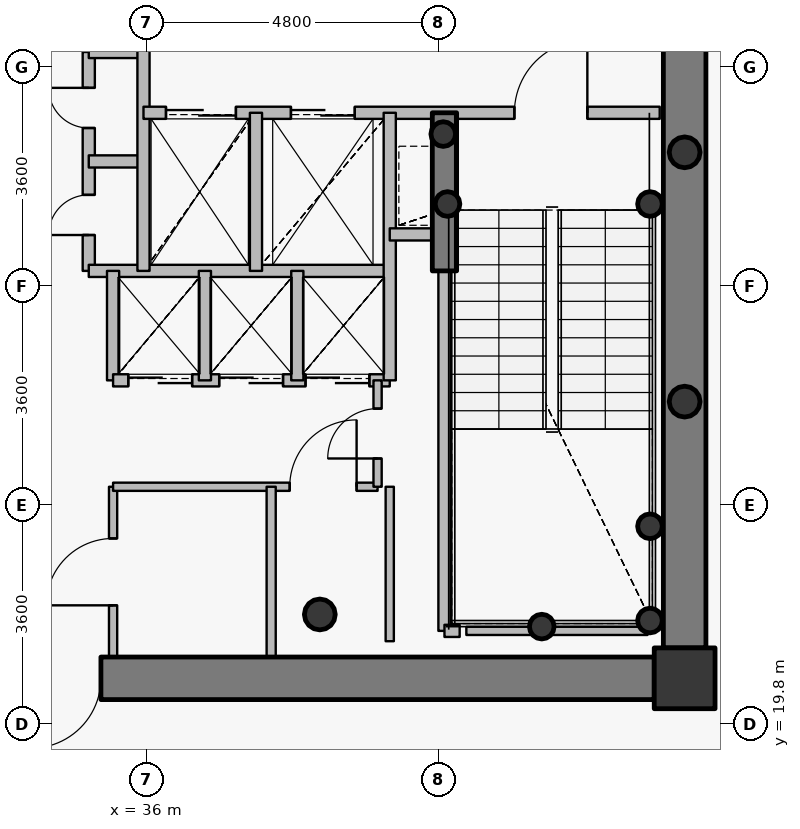
"""IFC4 building model, lengths in metres.
Left out: names, types, materials, properties, quantities, classifications, styles, units other than length and angle.
Written with IfcOpenShell. Run it as: python <this file> out.ifc"""

import sys

from ifc_helpers import new_model, si_unit, direction, frame, frame_2d, origin, origin_2d, place, context, subcontext, project, spatial, rectangle, hollow_circle, extrude, source, transform, mapped, element, fill, save


model = new_model("IFC4")
c1 = context("Model", 3, precision=1e-05, world=origin(), true_north=direction((0.0, 1.0)))
c2 = subcontext(c1, "Body", "Model", "MODEL_VIEW")
j1 = project(units=[si_unit("LENGTHUNIT", "METRE"), si_unit("PLANEANGLEUNIT", "RADIAN")], contexts=[c1])
p1 = place(None, origin())
s1 = spatial("IfcSite", under=j1, at=p1, CompositionType="ELEMENT")
p2 = place(p1, origin())
s2 = spatial("IfcBuilding", under=s1, at=p2, CompositionType="ELEMENT")
p3 = place(p2, frame((0.0, 0.0, 280.5)))
s3 = spatial("IfcBuildingStorey", under=s2, at=p3, CompositionType="ELEMENT", Elevation=280.5)
p4 = place(p3, frame((44.85, 20.55, 0.0), z_axis=(0.0, 0.0, 1.0), x_axis=(1.0, 0.0, 0.0)))
e1 = element("IfcColumn", 1, at=p4, inside=s3, PredefinedType="COLUMN", context=c2, shape_type="SweptSolid", body=[
    extrude(rectangle(XDim=1.0, YDim=1.0, at=origin_2d()), origin(), (0.0, 0.0, 1.0), 3.75),
])
p5 = place(p3, frame((38.85, 21.6, 0.0), z_axis=(0.0, 0.0, 1.0), x_axis=(1.0, 0.0, 0.0)))
e2 = element("IfcColumn", 2, at=p5, inside=s3, PredefinedType="COLUMN", context=c2, shape_type="SweptSolid", body=[
    extrude(hollow_circle(Radius=0.254, WallThickness=0.02, at=origin_2d()), origin(), (0.0, 0.0, 1.0), 3.75),
])
for number, where, z_axis, x_axis in (
    (3, (44.28, 21.5, 0.0), (0.0, 0.0, 1.0), (1.0, 0.0, 0.0)),
    (4, (44.28, 23.05, 0.0), (0.0, 0.0, 1.0), (1.0, 0.0, 0.0)),
    (5, (42.5, 21.4, 0.0), (0.0, 0.0, 1.0), (1.0, 0.0, 0.0)),
    (6, (40.95, 28.35, 0.0), (0.0, 0.0, 1.0), (1.0, 0.0, 0.0)),
    (7, (44.28, 28.35, 0.0), (0.0, 0.0, 1.0), (1.0, 0.0, 0.0)),
    (8, (40.88, 29.5, 0.0), (0.0, 0.0, 1.0), (1.0, 0.0, 0.0)),
):
    element("IfcColumn", number, at=place(p3, frame(where, z_axis=z_axis, x_axis=x_axis)), inside=s3, PredefinedType="COLUMN", context=c2, shape_type="SweptSolid", body=[
        extrude(hollow_circle(Radius=0.203, WallThickness=0.016, at=origin_2d()), origin(), (0.0, 0.0, 1.0), 3.75),
    ])
p6 = place(p3, frame((44.85, 32.95, 0.0), z_axis=(0.0, 0.0, 1.0), x_axis=(0.0, -1.0, 0.0)))
e9 = element("IfcWall", 9, at=p6, inside=s3, PredefinedType="SHEAR", context=c2, shape_type="SweptSolid", body=[
    extrude(rectangle(XDim=11.9, YDim=0.7, at=frame_2d((5.95, 0.0))), origin(), (0.0, 0.0, 1.0), 3.05),
])
p7 = place(p3, frame((44.35, 20.55, 0.0), z_axis=(0.0, 0.0, 1.0), x_axis=(-1.0, 0.0, 0.0)))
e10 = element("IfcWall", 10, at=p7, inside=s3, PredefinedType="SHEAR", context=c2, shape_type="SweptSolid", body=[
    extrude(rectangle(XDim=16.7, YDim=0.7, at=frame_2d((8.35, 0.0))), origin(), (0.0, 0.0, 1.0), 3.05),
])
p8 = place(p7, frame((12.925, 0.0, 0.0)))
e11 = element("IfcOpeningElement", 11, at=p8, cuts=e10, PredefinedType="OPENING", context=c2, shape_type="SweptSolid", body=[
    extrude(rectangle(XDim=1.15, YDim=2.15, at=origin_2d()), frame((0.575, 0.36, 1.075), z_axis=(0.0, -1.0, 0.0), x_axis=(1.0, 0.0, 0.0)), (0.0, 0.0, 1.0), 0.72),
])
p9 = place(p7, frame((9.1, 0.0, 0.0)))
e12 = element("IfcOpeningElement", 12, at=p9, cuts=e10, PredefinedType="OPENING", context=c2, shape_type="SweptSolid", body=[
    extrude(rectangle(XDim=1.15, YDim=2.15, at=origin_2d()), frame((0.575, 0.36, 1.075), z_axis=(0.0, -1.0, 0.0), x_axis=(1.0, 0.0, 0.0)), (0.0, 0.0, 1.0), 0.72),
])
p10 = place(p3, frame((40.9, 27.25, 0.0), z_axis=(0.0, 0.0, 1.0), x_axis=(0.0, 1.0, 0.0)))
e13 = element("IfcWall", 13, at=p10, inside=s3, PredefinedType="SHEAR", context=c2, shape_type="SweptSolid", body=[
    extrude(rectangle(XDim=2.6, YDim=0.4, at=frame_2d((1.3, 0.0))), origin(), (0.0, 0.0, 1.0), 3.1),
])
for number, where, z_axis, x_axis in (
    (14, (44.85, 25.1, 0.0), (0.0, 0.0, 1.0), (1.0, 0.0, 0.0)),
    (15, (44.85, 29.2, 0.0), (0.0, 0.0, 1.0), (1.0, 0.0, 0.0)),
):
    element("IfcColumn", number, at=place(p3, frame(where, z_axis=z_axis, x_axis=x_axis)), inside=s3, PredefinedType="COLUMN", context=c2, shape_type="SweptSolid", body=[
        extrude(hollow_circle(Radius=0.254, WallThickness=0.02, at=origin_2d()), origin(), (0.0, 0.0, 1.0), 3.75),
    ])
p11 = place(p3, frame((35.05, 27.25, 0.0), z_axis=(0.0, 0.0, 1.0), x_axis=(0.0, 1.0, 0.0)))
e16 = element("IfcWall", 16, at=p11, inside=s3, PredefinedType="PARTITIONING", context=c2, shape_type="SweptSolid", body=[
    extrude(rectangle(XDim=3.6, YDim=0.2, at=frame_2d((1.8, 0.0))), origin(), (0.0, 0.0, 1.0), 3.5),
])
p12 = place(p11, frame((0.59, 0.0, 0.0)))
e17 = element("IfcOpeningElement", 17, at=p12, cuts=e16, PredefinedType="OPENING", context=c2, shape_type="SweptSolid", body=[
    extrude(rectangle(XDim=0.66, YDim=2.05, at=origin_2d()), frame((0.33, 0.11, 1.025), z_axis=(0.0, -1.0, 0.0), x_axis=(1.0, 0.0, 0.0)), (0.0, 0.0, 1.0), 0.22),
])
p13 = place(p11, frame((2.35, 0.0, 0.0)))
e18 = element("IfcOpeningElement", 18, at=p13, cuts=e16, PredefinedType="OPENING", context=c2, shape_type="SweptSolid", body=[
    extrude(rectangle(XDim=0.66, YDim=2.05, at=origin_2d()), frame((0.33, 0.11, 1.025), z_axis=(0.0, -1.0, 0.0), x_axis=(1.0, 0.0, 0.0)), (0.0, 0.0, 1.0), 0.22),
])
p14 = place(p3, frame((35.05, 27.25, 0.0), z_axis=(0.0, 0.0, 1.0), x_axis=(1.0, 0.0, 0.0)))
e19 = element("IfcWall", 19, at=p14, inside=s3, PredefinedType="PARTITIONING", context=c2, shape_type="SweptSolid", body=[
    extrude(rectangle(XDim=4.95, YDim=0.2, at=frame_2d((2.475, 0.0))), origin(), (0.0, 0.0, 1.0), 3.085),
])
for number, where, z_axis, x_axis in (
    (20, (35.05, 29.05, 0.0), (0.0, 0.0, 1.0), (1.0, 0.0, 0.0)),
    (21, (35.05, 30.85, 0.0), (0.0, 0.0, 1.0), (1.0, 0.0, 0.0)),
):
    element("IfcWall", number, at=place(p3, frame(where, z_axis=z_axis, x_axis=x_axis)), inside=s3, PredefinedType="PARTITIONING", context=c2, shape_type="SweptSolid", body=[
        extrude(rectangle(XDim=0.9, YDim=0.2, at=frame_2d((0.45, 0.0))), origin(), (0.0, 0.0, 1.0), 3.5),
    ])
p15 = place(p3, frame((35.45, 20.9, 0.0), z_axis=(0.0, 0.0, 1.0), x_axis=(0.0, 1.0, 0.0)))
e22 = element("IfcWall", 22, at=p15, inside=s3, PredefinedType="PARTITIONING", context=c2, shape_type="SweptSolid", body=[
    extrude(rectangle(XDim=2.8, YDim=0.135, at=frame_2d((1.4, 0.0))), origin(), (0.0, 0.0, 1.0), 3.085),
])
p16 = place(p15, frame((0.85, 0.0, 0.0)))
e23 = element("IfcOpeningElement", 23, at=p16, cuts=e22, PredefinedType="OPENING", context=c2, shape_type="SweptSolid", body=[
    extrude(rectangle(XDim=1.1, YDim=2.15, at=origin_2d()), frame((0.55, 0.078, 1.075), z_axis=(0.0, -1.0, 0.0), x_axis=(1.0, 0.0, 0.0)), (0.0, 0.0, 1.0), 0.155),
])
p17 = place(p3, frame((35.45, 23.7, 0.0), z_axis=(0.0, 0.0, 1.0), x_axis=(1.0, 0.0, 0.0)))
e24 = element("IfcWall", 24, at=p17, inside=s3, PredefinedType="PARTITIONING", context=c2, shape_type="SweptSolid", body=[
    extrude(rectangle(XDim=4.35, YDim=0.135, at=frame_2d((2.175, 0.0))), origin(), (0.0, 0.0, 1.0), 3.085),
])
p18 = place(p17, frame((2.905, 0.0, 0.0)))
e25 = element("IfcOpeningElement", 25, at=p18, cuts=e24, PredefinedType="OPENING", context=c2, shape_type="SweptSolid", body=[
    extrude(rectangle(XDim=1.1, YDim=2.15, at=origin_2d()), frame((0.55, 0.078, 1.075), z_axis=(0.0, -1.0, 0.0), x_axis=(1.0, 0.0, 0.0)), (0.0, 0.0, 1.0), 0.155),
])
p19 = place(p3, frame((35.45, 25.45, 0.0), z_axis=(0.0, 0.0, 1.0), x_axis=(0.0, 1.0, 0.0)))
e26 = element("IfcWall", 26, at=p19, inside=s3, PredefinedType="PARTITIONING", context=c2, shape_type="SweptSolid", body=[
    extrude(rectangle(XDim=1.8, YDim=0.2, at=frame_2d((0.9, 0.0))), origin(), (0.0, 0.0, 1.0), 3.5),
])
p20 = place(p3, frame((35.45, 25.45, 0.0), z_axis=(0.0, 0.0, 1.0), x_axis=(1.0, 0.0, 0.0)))
e27 = element("IfcWall", 27, at=p20, inside=s3, PredefinedType="PARTITIONING", context=c2, shape_type="SweptSolid", body=[
    extrude(rectangle(XDim=4.55, YDim=0.2, at=frame_2d((2.275, 0.0))), origin(), (0.0, 0.0, 1.0), 3.085),
])
p21 = place(p20, frame((0.25, 0.0, 0.0)))
e28 = element("IfcOpeningElement", 28, at=p21, cuts=e27, PredefinedType="OPENING", context=c2, shape_type="SweptSolid", body=[
    extrude(rectangle(XDim=1.05, YDim=2.15, at=origin_2d()), frame((0.525, 0.11, 1.075), z_axis=(0.0, -1.0, 0.0), x_axis=(1.0, 0.0, 0.0)), (0.0, 0.0, 1.0), 0.22),
])
p22 = place(p20, frame((1.745, 0.0, 0.0)))
e29 = element("IfcOpeningElement", 29, at=p22, cuts=e27, PredefinedType="OPENING", context=c2, shape_type="SweptSolid", body=[
    extrude(rectangle(XDim=1.05, YDim=2.15, at=origin_2d()), frame((0.525, 0.11, 1.075), z_axis=(0.0, -1.0, 0.0), x_axis=(1.0, 0.0, 0.0)), (0.0, 0.0, 1.0), 0.22),
])
p23 = place(p20, frame((3.165, 0.0, 0.0)))
e30 = element("IfcOpeningElement", 30, at=p23, cuts=e27, PredefinedType="OPENING", context=c2, shape_type="SweptSolid", body=[
    extrude(rectangle(XDim=1.05, YDim=2.15, at=origin_2d()), frame((0.525, 0.11, 1.075), z_axis=(0.0, -1.0, 0.0), x_axis=(1.0, 0.0, 0.0)), (0.0, 0.0, 1.0), 0.22),
])
p24 = place(p3, frame((35.95, 27.25, 0.0), z_axis=(0.0, 0.0, 1.0), x_axis=(0.0, 1.0, 0.0)))
e31 = element("IfcWall", 31, at=p24, inside=s3, PredefinedType="PARTITIONING", context=c2, shape_type="SweptSolid", body=[
    extrude(rectangle(XDim=3.8, YDim=0.2, at=frame_2d((1.9, 0.0))), origin(), (0.0, 0.0, 1.0), 3.5),
])
p25 = place(p3, frame((35.95, 29.85, 0.0), z_axis=(0.0, 0.0, 1.0), x_axis=(1.0, 0.0, 0.0)))
e32 = element("IfcWall", 32, at=p25, inside=s3, PredefinedType="PARTITIONING", context=c2, shape_type="SweptSolid", body=[
    extrude(rectangle(XDim=8.49, YDim=0.2, at=frame_2d((4.245, 0.0))), origin(), (0.0, 0.0, 1.0), 3.085),
])
p26 = place(p25, frame((6.1, 0.0, 0.0)))
e33 = element("IfcOpeningElement", 33, at=p26, cuts=e32, PredefinedType="OPENING", context=c2, shape_type="SweptSolid", body=[
    extrude(rectangle(XDim=1.2, YDim=2.15, at=origin_2d()), frame((0.6, 0.11, 1.075), z_axis=(0.0, -1.0, 0.0), x_axis=(1.0, 0.0, 0.0)), (0.0, 0.0, 1.0), 0.22),
])
p27 = place(p25, frame((0.37, 0.0, 0.0)))
e34 = element("IfcOpeningElement", 34, at=p27, cuts=e32, PredefinedType="OPENING", context=c2, shape_type="SweptSolid", body=[
    extrude(rectangle(XDim=1.15, YDim=2.15, at=origin_2d()), frame((0.575, 0.11, 1.075), z_axis=(0.0, -1.0, 0.0), x_axis=(1.0, 0.0, 0.0)), (0.0, 0.0, 1.0), 0.22),
])
p28 = place(p25, frame((2.425, 0.0, 0.0)))
e35 = element("IfcOpeningElement", 35, at=p28, cuts=e32, PredefinedType="OPENING", context=c2, shape_type="SweptSolid", body=[
    extrude(rectangle(XDim=1.05, YDim=2.15, at=origin_2d()), frame((0.525, 0.11, 1.075), z_axis=(0.0, -1.0, 0.0), x_axis=(1.0, 0.0, 0.0)), (0.0, 0.0, 1.0), 0.22),
])
p29 = place(p3, frame((36.96, 25.45, 0.0), z_axis=(0.0, 0.0, 1.0), x_axis=(0.0, 1.0, 0.0)))
e36 = element("IfcWall", 36, at=p29, inside=s3, PredefinedType="PARTITIONING", context=c2, shape_type="SweptSolid", body=[
    extrude(rectangle(XDim=1.8, YDim=0.2, at=frame_2d((0.9, 0.0))), origin(), (0.0, 0.0, 1.0), 3.5),
])
p30 = place(p3, frame((37.8, 27.25, 0.0), z_axis=(0.0, 0.0, 1.0), x_axis=(0.0, 1.0, 0.0)))
e37 = element("IfcWall", 37, at=p30, inside=s3, PredefinedType="PARTITIONING", context=c2, shape_type="SweptSolid", body=[
    extrude(rectangle(XDim=2.6, YDim=0.2, at=frame_2d((1.3, 0.0))), origin(), (0.0, 0.0, 1.0), 3.5),
])
p31 = place(p3, frame((38.05, 20.38, 0.0), z_axis=(0.0, 0.0, 1.0), x_axis=(0.0, 1.0, 0.0)))
e38 = element("IfcWall", 38, at=p31, inside=s3, PredefinedType="PARTITIONING", context=c2, shape_type="SweptSolid", body=[
    extrude(rectangle(XDim=3.32, YDim=0.15, at=frame_2d((1.66, 0.0))), origin(), (0.0, 0.0, 1.0), 3.035),
])
p32 = place(p3, frame((38.48, 25.45, 0.0), z_axis=(0.0, 0.0, 1.0), x_axis=(0.0, 1.0, 0.0)))
e39 = element("IfcWall", 39, at=p32, inside=s3, PredefinedType="PARTITIONING", context=c2, shape_type="SweptSolid", body=[
    extrude(rectangle(XDim=1.8, YDim=0.2, at=frame_2d((0.9, 0.0))), origin(), (0.0, 0.0, 1.0), 3.5),
])
p33 = place(p3, frame((39.8, 23.7, 0.0), z_axis=(0.0, 0.0, 1.0), x_axis=(0.0, 1.0, 0.0)))
e40 = element("IfcWall", 40, at=p33, inside=s3, PredefinedType="PARTITIONING", context=c2, shape_type="SweptSolid", body=[
    extrude(rectangle(XDim=1.75, YDim=0.135, at=frame_2d((0.875, 0.0))), origin(), (0.0, 0.0, 1.0), 3.5),
])
p34 = place(p33, frame((0.465, 0.0, 0.0)))
e41 = element("IfcOpeningElement", 41, at=p34, cuts=e40, PredefinedType="OPENING", context=c2, shape_type="SweptSolid", body=[
    extrude(rectangle(XDim=0.82, YDim=2.1, at=origin_2d()), frame((0.41, 0.078, 1.05), z_axis=(0.0, -1.0, 0.0), x_axis=(1.0, 0.0, 0.0)), (0.0, 0.0, 1.0), 0.155),
])
p35 = place(p3, frame((40.0, 25.45, 0.0), z_axis=(0.0, 0.0, 1.0), x_axis=(0.0, 1.0, 0.0)))
e42 = element("IfcWall", 42, at=p35, inside=s3, PredefinedType="PARTITIONING", context=c2, shape_type="SweptSolid", body=[
    extrude(rectangle(XDim=4.4, YDim=0.2, at=frame_2d((2.2, 0.0))), origin(), (0.0, 0.0, 1.0), 3.5),
])
p36 = place(p3, frame((40.0, 27.85, 0.0), z_axis=(0.0, 0.0, 1.0), x_axis=(1.0, 0.0, 0.0)))
e43 = element("IfcWall", 43, at=p36, inside=s3, PredefinedType="PARTITIONING", context=c2, shape_type="SweptSolid", body=[
    extrude(rectangle(XDim=0.9, YDim=0.2, at=frame_2d((0.45, 0.0))), origin(), (0.0, 0.0, 1.0), 3.5),
])
p37 = place(p3, frame((40.9, 21.33, 0.0), z_axis=(0.0, 0.0, 1.0), x_axis=(0.0, 1.0, 0.0)))
e44 = element("IfcWall", 44, at=p37, inside=s3, PredefinedType="PARTITIONING", context=c2, shape_type="SweptSolid", body=[
    extrude(rectangle(XDim=5.91, YDim=0.2, at=frame_2d((2.955, 0.0))), origin(), (0.0, 0.0, 1.0), 3.035),
])
p38 = place(p3, frame((40.9, 21.33, 0.0), z_axis=(0.0, 0.0, 1.0), x_axis=(1.0, 0.0, 0.0)))
e45 = element("IfcWall", 45, at=p38, inside=s3, PredefinedType="PARTITIONING", context=c2, shape_type="SweptSolid", body=[
    extrude(rectangle(XDim=0.25, YDim=0.2, at=frame_2d((0.125, 0.0))), origin(), (0.0, 0.0, 1.0), 3.035),
])
p39 = place(p3, frame((44.24, 21.33, 0.0), z_axis=(0.0, 0.0, 1.0), x_axis=(-1.0, 0.0, 0.0)))
e46 = element("IfcWall", 46, at=p39, inside=s3, PredefinedType="PARTITIONING", context=c2, shape_type="SweptSolid", body=[
    extrude(rectangle(XDim=2.98, YDim=0.135, at=frame_2d((1.49, 0.0))), origin(), (0.0, 0.0, 1.0), 3.035),
])
p40 = place(p3, frame((40.0, 23.7, 0.0), z_axis=(0.0, 0.0, 1.0), x_axis=(0.0, -1.0, 0.0)))
e47 = element("IfcWall", 47, at=p40, inside=s3, PredefinedType="PARTITIONING", context=c2, shape_type="SweptSolid", body=[
    extrude(rectangle(XDim=2.54, YDim=0.135, at=frame_2d((1.27, 0.0))), origin(), (0.0, 0.0, 1.0), 3.035),
])
p41 = place(p3, frame((44.36, 20.2, 0.0), z_axis=(0.0, 0.0, 1.0), x_axis=(1.0, 0.0, 0.0)))
e48 = element("IfcWall", 48, at=p41, inside=s3, PredefinedType="PARTITIONING", context=c2, shape_type="SweptSolid", body=[
    extrude(rectangle(XDim=0.84, YDim=0.135, at=frame_2d((0.42, 0.0))), origin(), (0.0, 0.0, 1.0), 3.035),
])
p42 = place(p3, frame((45.2, 20.508, 0.0), z_axis=(0.0, 0.0, 1.0), x_axis=(0.0, 1.0, 0.0)))
e49 = element("IfcWall", 49, at=p42, inside=s3, PredefinedType="PARTITIONING", context=c2, shape_type="SweptSolid", body=[
    extrude(rectangle(XDim=0.532, YDim=0.135, at=frame_2d((0.266, 0.0))), origin(), (0.0, 0.0, 1.0), 3.5),
])
m1 = source(origin(), c2, "Body", "SweptSolid", [
    extrude(rectangle(XDim=1.15, YDim=2.15, at=origin_2d()), frame((0.575, 0.025, 1.075), z_axis=(0.0, -1.0, 0.0), x_axis=(1.0, 0.0, 0.0)), (0.0, 0.0, 1.0), 0.05),
])
p43 = place(p9, origin())
e50 = element("IfcDoor", 50, at=p43, inside=s3, OperationType="SINGLE_SWING_RIGHT", PredefinedType="DOOR", context=c2, shape_type="MappedRepresentation", body=[
    mapped(m1, transform((0.0, 0.0, 0.0), x_axis=(1.0, 0.0, 0.0), y_axis=(0.0, 1.0, 0.0), z_axis=(0.0, 0.0, 1.0), scale=1.0)),
])
fill(e12, e50)
m2 = source(origin(), c2, "Body", "SweptSolid", [
    extrude(rectangle(XDim=1.2, YDim=2.15, at=origin_2d()), frame((0.6, 0.025, 1.075), z_axis=(0.0, -1.0, 0.0), x_axis=(1.0, 0.0, 0.0)), (0.0, 0.0, 1.0), 0.05),
])
p44 = place(p26, origin())
e51 = element("IfcDoor", 51, at=p44, inside=s3, OperationType="SINGLE_SWING_RIGHT", PredefinedType="DOOR", context=c2, shape_type="MappedRepresentation", body=[
    mapped(m2, transform((0.0, 0.0, 0.0), x_axis=(1.0, 0.0, 0.0), y_axis=(0.0, 1.0, 0.0), z_axis=(0.0, 0.0, 1.0), scale=1.0)),
])
fill(e33, e51)
m3 = source(origin(), c2, "Body", "SweptSolid", [
    extrude(rectangle(XDim=1.15, YDim=2.15, at=origin_2d()), frame((0.575, 0.025, 1.075), z_axis=(0.0, -1.0, 0.0), x_axis=(1.0, 0.0, 0.0)), (0.0, 0.0, 1.0), 0.05),
])
p45 = place(p27, origin())
e52 = element("IfcDoor", 52, at=p45, inside=s3, OperationType="DOUBLE_DOOR_SLIDING", PredefinedType="USERDEFINED", context=c2, shape_type="MappedRepresentation", body=[
    mapped(m3, transform((0.0, 0.0, 0.0), x_axis=(1.0, 0.0, 0.0), y_axis=(0.0, 1.0, 0.0), z_axis=(0.0, 0.0, 1.0), scale=1.0)),
])
fill(e34, e52)
m4 = source(origin(), c2, "Body", "SweptSolid", [
    extrude(rectangle(XDim=1.05, YDim=2.15, at=origin_2d()), frame((0.525, 0.025, 1.075), z_axis=(0.0, -1.0, 0.0), x_axis=(1.0, 0.0, 0.0)), (0.0, 0.0, 1.0), 0.05),
])
p46 = place(p28, origin())
e53 = element("IfcDoor", 53, at=p46, inside=s3, OperationType="DOUBLE_DOOR_SLIDING", PredefinedType="USERDEFINED", context=c2, shape_type="MappedRepresentation", body=[
    mapped(m4, transform((0.0, 0.0, 0.0), x_axis=(1.0, 0.0, 0.0), y_axis=(0.0, 1.0, 0.0), z_axis=(0.0, 0.0, 1.0), scale=1.0)),
])
fill(e35, e53)
p47 = place(p21, origin())
e54 = element("IfcDoor", 54, at=p47, inside=s3, OperationType="DOUBLE_DOOR_SLIDING", PredefinedType="USERDEFINED", context=c2, shape_type="MappedRepresentation", body=[
    mapped(m4, transform((0.0, 0.0, 0.0), x_axis=(1.0, 0.0, 0.0), y_axis=(0.0, 1.0, 0.0), z_axis=(0.0, 0.0, 1.0), scale=1.0)),
])
fill(e28, e54)
p48 = place(p22, origin())
e55 = element("IfcDoor", 55, at=p48, inside=s3, OperationType="DOUBLE_DOOR_SLIDING", PredefinedType="USERDEFINED", context=c2, shape_type="MappedRepresentation", body=[
    mapped(m4, transform((0.0, 0.0, 0.0), x_axis=(1.0, 0.0, 0.0), y_axis=(0.0, 1.0, 0.0), z_axis=(0.0, 0.0, 1.0), scale=1.0)),
])
fill(e29, e55)
p49 = place(p23, origin())
e56 = element("IfcDoor", 56, at=p49, inside=s3, OperationType="DOUBLE_DOOR_SLIDING", PredefinedType="USERDEFINED", context=c2, shape_type="MappedRepresentation", body=[
    mapped(m4, transform((0.0, 0.0, 0.0), x_axis=(1.0, 0.0, 0.0), y_axis=(0.0, 1.0, 0.0), z_axis=(0.0, 0.0, 1.0), scale=1.0)),
])
fill(e30, e56)
m5 = source(origin(), c2, "Body", "SweptSolid", [
    extrude(rectangle(XDim=0.66, YDim=2.05, at=origin_2d()), frame((0.33, 0.025, 1.025), z_axis=(0.0, -1.0, 0.0), x_axis=(1.0, 0.0, 0.0)), (0.0, 0.0, 1.0), 0.05),
])
p50 = place(p12, origin())
e57 = element("IfcDoor", 57, at=p50, inside=s3, OperationType="SINGLE_SWING_LEFT", PredefinedType="USERDEFINED", context=c2, shape_type="MappedRepresentation", body=[
    mapped(m5, transform((0.0, 0.0, 0.0), x_axis=(1.0, 0.0, 0.0), y_axis=(0.0, 1.0, 0.0), z_axis=(0.0, 0.0, 1.0), scale=1.0)),
])
fill(e17, e57)
p51 = place(p13, origin())
e58 = element("IfcDoor", 58, at=p51, inside=s3, OperationType="SINGLE_SWING_RIGHT", PredefinedType="USERDEFINED", context=c2, shape_type="MappedRepresentation", body=[
    mapped(m5, transform((0.0, 0.0, 0.0), x_axis=(1.0, 0.0, 0.0), y_axis=(0.0, 1.0, 0.0), z_axis=(0.0, 0.0, 1.0), scale=1.0)),
])
fill(e18, e58)
m6 = source(origin(), c2, "Body", "SweptSolid", [
    extrude(rectangle(XDim=1.1, YDim=2.15, at=origin_2d()), frame((0.55, 0.025, 1.075), z_axis=(0.0, -1.0, 0.0), x_axis=(1.0, 0.0, 0.0)), (0.0, 0.0, 1.0), 0.05),
])
p52 = place(p16, origin())
e59 = element("IfcDoor", 59, at=p52, inside=s3, OperationType="SINGLE_SWING_LEFT", PredefinedType="DOOR", context=c2, shape_type="MappedRepresentation", body=[
    mapped(m6, transform((0.0, 0.0, 0.0), x_axis=(1.0, 0.0, 0.0), y_axis=(0.0, 1.0, 0.0), z_axis=(0.0, 0.0, 1.0), scale=1.0)),
])
fill(e23, e59)
p53 = place(p18, origin())
e60 = element("IfcDoor", 60, at=p53, inside=s3, OperationType="SINGLE_SWING_RIGHT", PredefinedType="DOOR", context=c2, shape_type="MappedRepresentation", body=[
    mapped(m6, transform((0.0, 0.0, 0.0), x_axis=(1.0, 0.0, 0.0), y_axis=(0.0, 1.0, 0.0), z_axis=(0.0, 0.0, 1.0), scale=1.0)),
])
fill(e25, e60)
m7 = source(origin(), c2, "Body", "SweptSolid", [
    extrude(rectangle(XDim=0.82, YDim=2.1, at=origin_2d()), frame((0.41, 0.025, 1.05), z_axis=(0.0, -1.0, 0.0), x_axis=(1.0, 0.0, 0.0)), (0.0, 0.0, 1.0), 0.05),
])
p54 = place(p34, origin())
e61 = element("IfcDoor", 61, at=p54, inside=s3, OperationType="SINGLE_SWING_LEFT", PredefinedType="DOOR", context=c2, shape_type="MappedRepresentation", body=[
    mapped(m7, transform((0.0, 0.0, 0.0), x_axis=(1.0, 0.0, 0.0), y_axis=(0.0, 1.0, 0.0), z_axis=(0.0, 0.0, 1.0), scale=1.0)),
])
fill(e41, e61)
save(model, sys.argv[1])
